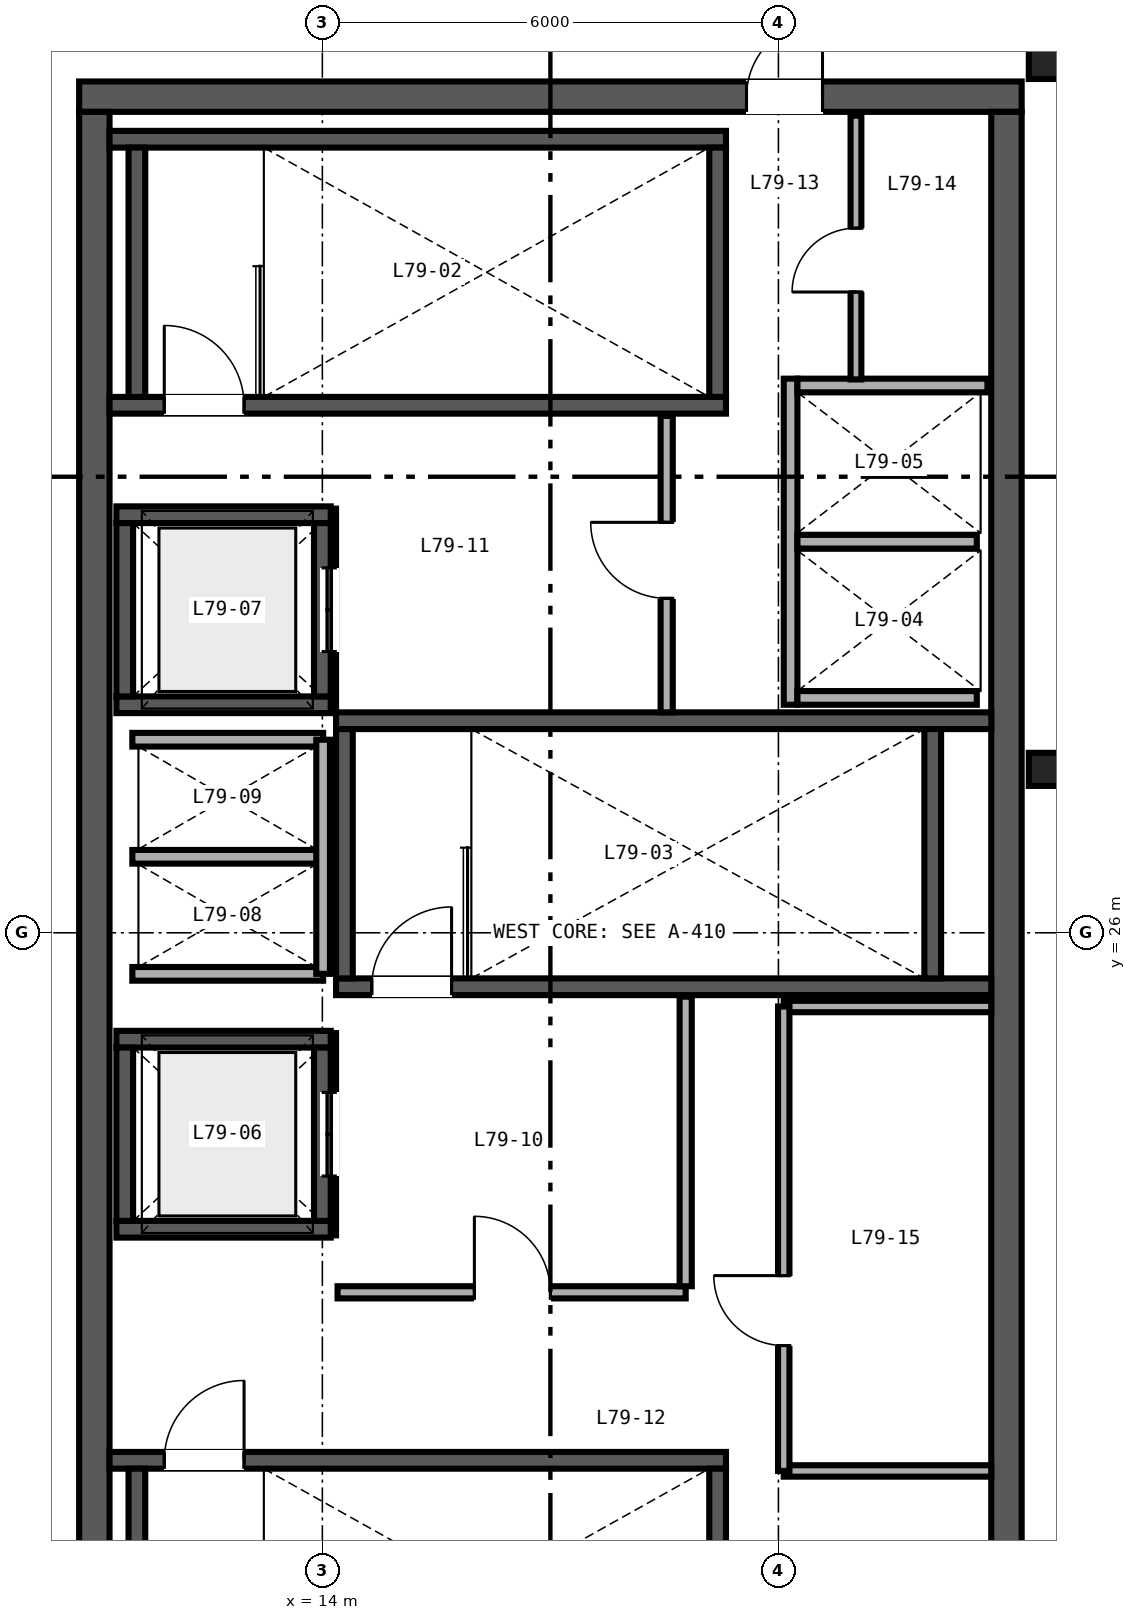
"""IFC4 building model, lengths in metres.
Left out: names, types, materials, properties, quantities, classifications, styles, units other than length and angle.
Written with IfcOpenShell. Run it as: python <this file> out.ifc"""

import sys

from ifc_helpers import new_model, si_unit, direction, frame, frame_2d, origin, origin_2d, place, context, subcontext, project, spatial, rectangle, i_section, extrude, source, transform, mapped, element, fill, save


model = new_model("IFC4")
c1 = context("Model", 3, precision=1e-05, world=origin(), true_north=direction((0.0, 1.0)))
c2 = subcontext(c1, "Body", "Model", "MODEL_VIEW")
j1 = project(units=[si_unit("LENGTHUNIT", "METRE"), si_unit("PLANEANGLEUNIT", "RADIAN")], contexts=[c1])
p1 = place(None, origin())
s1 = spatial("IfcSite", under=j1, at=p1, CompositionType="ELEMENT")
p2 = place(p1, origin())
s2 = spatial("IfcBuilding", under=s1, at=p2, CompositionType="ELEMENT")
p3 = place(p2, frame((0.0, 0.0, 309.6)))
s3 = spatial("IfcBuildingStorey", under=s2, at=p3, CompositionType="ELEMENT", Elevation=309.6)
p4 = place(p3, frame((10.8, 37.0, 0.0), z_axis=(0.0, 0.0, 1.0), x_axis=(1.0, 0.0, 0.0)))
e1 = element("IfcWall", 1, at=p4, inside=s3, PredefinedType="SHEAR", context=c2, shape_type="SweptSolid", body=[
    extrude(rectangle(XDim=12.4, YDim=0.4, at=frame_2d((6.2, 0.0))), origin(), (0.0, 0.0, 1.0), 5.0),
])
p5 = place(p4, frame((8.78, 0.0, 0.0)))
e2 = element("IfcOpeningElement", 2, at=p5, cuts=e1, PredefinedType="OPENING", context=c2, shape_type="SweptSolid", body=[
    extrude(rectangle(XDim=1.0, YDim=2.15, at=frame_2d((0.5, 1.075))), frame((0.0, 0.21, 0.0), z_axis=(0.0, -1.0, 0.0), x_axis=(1.0, 0.0, 0.0)), (0.0, 0.0, 1.0), 0.42),
])
for number, where, z_axis, x_axis in (
    (3, (11.0, 15.2, 0.0), (0.0, 0.0, 1.0), (0.0, 1.0, 0.0)),
    (4, (23.0, 15.2, 0.0), (0.0, 0.0, 1.0), (0.0, 1.0, 0.0)),
):
    element("IfcWall", number, at=place(p3, frame(where, z_axis=z_axis, x_axis=x_axis)), inside=s3, PredefinedType="SHEAR", context=c2, shape_type="SweptSolid", body=[
        extrude(rectangle(XDim=21.6, YDim=0.4, at=frame_2d((10.8, 0.0))), origin(), (0.0, 0.0, 1.0), 5.0),
    ])
p6 = place(p3, frame((11.2, 19.06, 0.0), z_axis=(0.0, 0.0, 1.0), x_axis=(1.0, 0.0, 0.0)))
e5 = element("IfcWall", 5, at=p6, inside=s3, PredefinedType="SHEAR", context=c2, shape_type="SweptSolid", body=[
    extrude(rectangle(XDim=8.11, YDim=0.22, at=frame_2d((4.055, 0.0))), origin(), (0.0, 0.0, 1.0), 5.0),
])
p7 = place(p6, frame((0.72, 0.0, 0.0)))
e6 = element("IfcOpeningElement", 6, at=p7, cuts=e5, PredefinedType="OPENING", context=c2, shape_type="SweptSolid", body=[
    extrude(rectangle(XDim=1.05, YDim=2.15, at=frame_2d((0.525, 1.075))), frame((0.0, 0.12, 0.0), z_axis=(0.0, -1.0, 0.0), x_axis=(1.0, 0.0, 0.0)), (0.0, 0.0, 1.0), 0.24),
])
for number, where, z_axis, x_axis in (
    (7, (11.56, 15.67, 0.0), (0.0, 0.0, 1.0), (0.0, 1.0, 0.0)),
    (8, (19.2, 15.67, 0.0), (0.0, 0.0, 1.0), (0.0, 1.0, 0.0)),
):
    element("IfcWall", number, at=place(p3, frame(where, z_axis=z_axis, x_axis=x_axis)), inside=s3, PredefinedType="SHEAR", context=c2, shape_type="SweptSolid", body=[
        extrude(rectangle(XDim=3.28, YDim=0.22, at=frame_2d((1.64, 0.0))), origin(), (0.0, 0.0, 1.0), 5.0),
    ])
p8 = place(p3, frame((11.2, 32.94, 0.0), z_axis=(0.0, 0.0, 1.0), x_axis=(1.0, 0.0, 0.0)))
e9 = element("IfcWall", 9, at=p8, inside=s3, PredefinedType="SHEAR", context=c2, shape_type="SweptSolid", body=[
    extrude(rectangle(XDim=8.11, YDim=0.22, at=frame_2d((4.055, 0.0))), origin(), (0.0, 0.0, 1.0), 5.0),
])
p9 = place(p8, frame((0.72, 0.0, 0.0)))
e10 = element("IfcOpeningElement", 10, at=p9, cuts=e9, PredefinedType="OPENING", context=c2, shape_type="SweptSolid", body=[
    extrude(rectangle(XDim=1.05, YDim=2.15, at=frame_2d((0.525, 1.075))), frame((0.0, 0.12, 0.0), z_axis=(0.0, -1.0, 0.0), x_axis=(1.0, 0.0, 0.0)), (0.0, 0.0, 1.0), 0.24),
])
p10 = place(p3, frame((11.2, 36.44, 0.0), z_axis=(0.0, 0.0, 1.0), x_axis=(1.0, 0.0, 0.0)))
e11 = element("IfcWall", 11, at=p10, inside=s3, PredefinedType="SHEAR", context=c2, shape_type="SweptSolid", body=[
    extrude(rectangle(XDim=8.11, YDim=0.22, at=frame_2d((4.055, 0.0))), origin(), (0.0, 0.0, 1.0), 5.0),
])
for number, where, z_axis, x_axis in (
    (12, (11.56, 33.05, 0.0), (0.0, 0.0, 1.0), (0.0, 1.0, 0.0)),
    (13, (19.2, 33.05, 0.0), (0.0, 0.0, 1.0), (0.0, 1.0, 0.0)),
):
    element("IfcWall", number, at=place(p3, frame(where, z_axis=z_axis, x_axis=x_axis)), inside=s3, PredefinedType="SHEAR", context=c2, shape_type="SweptSolid", body=[
        extrude(rectangle(XDim=3.28, YDim=0.22, at=frame_2d((1.64, 0.0))), origin(), (0.0, 0.0, 1.0), 5.0),
    ])
p11 = place(p3, frame((14.18, 25.29, 0.0), z_axis=(0.0, 0.0, 1.0), x_axis=(1.0, 0.0, 0.0)))
e14 = element("IfcWall", 14, at=p11, inside=s3, PredefinedType="SHEAR", context=c2, shape_type="SweptSolid", body=[
    extrude(rectangle(XDim=8.62, YDim=0.22, at=frame_2d((4.31, 0.0))), origin(), (0.0, 0.0, 1.0), 5.0),
])
p12 = place(p11, frame((0.47, 0.0, 0.0)))
e15 = element("IfcOpeningElement", 15, at=p12, cuts=e14, PredefinedType="OPENING", context=c2, shape_type="SweptSolid", body=[
    extrude(rectangle(XDim=1.05, YDim=2.15, at=frame_2d((0.525, 1.075))), frame((0.0, 0.12, 0.0), z_axis=(0.0, -1.0, 0.0), x_axis=(1.0, 0.0, 0.0)), (0.0, 0.0, 1.0), 0.24),
])
p13 = place(p3, frame((14.18, 28.79, 0.0), z_axis=(0.0, 0.0, 1.0), x_axis=(1.0, 0.0, 0.0)))
e16 = element("IfcWall", 16, at=p13, inside=s3, PredefinedType="SHEAR", context=c2, shape_type="SweptSolid", body=[
    extrude(rectangle(XDim=8.62, YDim=0.22, at=frame_2d((4.31, 0.0))), origin(), (0.0, 0.0, 1.0), 5.0),
])
for number, where, z_axis, x_axis in (
    (17, (14.29, 25.4, 0.0), (0.0, 0.0, 1.0), (0.0, 1.0, 0.0)),
    (18, (22.03, 25.4, 0.0), (0.0, 0.0, 1.0), (0.0, 1.0, 0.0)),
):
    element("IfcWall", number, at=place(p3, frame(where, z_axis=z_axis, x_axis=x_axis)), inside=s3, PredefinedType="SHEAR", context=c2, shape_type="SweptSolid", body=[
        extrude(rectangle(XDim=3.28, YDim=0.22, at=frame_2d((1.64, 0.0))), origin(), (0.0, 0.0, 1.0), 5.0),
    ])
m1 = source(origin(), c2, "Body", "SweptSolid", [
    extrude(i_section(OverallWidth=0.412, OverallDepth=0.435, WebThickness=0.036, FlangeThickness=0.057, FilletRadius=0.025, at=origin_2d()), origin(), (0.0, 0.0, 1.0), 5.0),
])
for number, where, z_axis, x_axis in (
    (19, (23.5, 28.15, 0.0), (0.0, 0.0, 1.0), (1.0, 0.0, 0.0)),
    (20, (23.5, 37.45, 0.0), (0.0, 0.0, 1.0), (1.0, 0.0, 0.0)),
):
    element("IfcColumn", number, at=place(p3, frame(where, z_axis=z_axis, x_axis=x_axis)), inside=s3, PredefinedType="COLUMN", context=c2, shape_type="MappedRepresentation", body=[
        mapped(m1, transform((0.0, 0.0, 0.0), scale=1.0)),
    ])
p14 = place(p3, frame((20.16, 29.0, 0.0), z_axis=(0.0, 0.0, 1.0), x_axis=(0.0, 1.0, 0.0)))
e21 = element("IfcWall", 21, at=p14, inside=s3, PredefinedType="SOLIDWALL", context=c2, shape_type="SweptSolid", body=[
    extrude(rectangle(XDim=4.29, YDim=0.18, at=frame_2d((2.145, 0.0))), origin(), (0.0, 0.0, 1.0), 4.591),
])
p15 = place(p3, frame((20.25, 29.09, 0.0), z_axis=(0.0, 0.0, 1.0), x_axis=(1.0, 0.0, 0.0)))
e22 = element("IfcWall", 22, at=p15, inside=s3, PredefinedType="SOLIDWALL", context=c2, shape_type="SweptSolid", body=[
    extrude(rectangle(XDim=2.36, YDim=0.18, at=frame_2d((1.18, 0.0))), origin(), (0.0, 0.0, 1.0), 4.591),
])
p16 = place(p3, frame((20.25, 33.2, 0.0), z_axis=(0.0, 0.0, 1.0), x_axis=(1.0, 0.0, 0.0)))
e23 = element("IfcWall", 23, at=p16, inside=s3, PredefinedType="SOLIDWALL", context=c2, shape_type="SweptSolid", body=[
    extrude(rectangle(XDim=2.5, YDim=0.18, at=frame_2d((1.25, 0.0))), origin(), (0.0, 0.0, 1.0), 5.0),
])
p17 = place(p3, frame((20.25, 31.145, 0.0), z_axis=(0.0, 0.0, 1.0), x_axis=(1.0, 0.0, 0.0)))
e24 = element("IfcWall", 24, at=p17, inside=s3, PredefinedType="SOLIDWALL", context=c2, shape_type="SweptSolid", body=[
    extrude(rectangle(XDim=2.36, YDim=0.18, at=frame_2d((1.18, 0.0))), origin(), (0.0, 0.0, 1.0), 5.0),
])
for number, where, z_axis, x_axis in (
    (25, (11.5, 22.11, 0.0), (0.0, 0.0, 1.0), (1.0, 0.0, 0.0)),
    (26, (11.5, 24.59, 0.0), (0.0, 0.0, 1.0), (1.0, 0.0, 0.0)),
):
    element("IfcWall", number, at=place(p3, frame(where, z_axis=z_axis, x_axis=x_axis)), inside=s3, PredefinedType="SOLIDWALL", context=c2, shape_type="SweptSolid", body=[
        extrude(rectangle(XDim=2.5, YDim=0.18, at=frame_2d((1.25, 0.0))), origin(), (0.0, 0.0, 1.0), 4.591),
    ])
p18 = place(p3, frame((14.09, 22.02, 0.0), z_axis=(0.0, 0.0, 1.0), x_axis=(0.0, 1.0, 0.0)))
e27 = element("IfcWall", 27, at=p18, inside=s3, PredefinedType="SOLIDWALL", context=c2, shape_type="SweptSolid", body=[
    extrude(rectangle(XDim=2.66, YDim=0.18, at=frame_2d((1.33, 0.0))), origin(), (0.0, 0.0, 1.0), 4.591),
])
p19 = place(p18, frame((0.78, 0.0, 0.0)))
e28 = element("IfcOpeningElement", 28, at=p19, cuts=e27, PredefinedType="OPENING", context=c2, shape_type="SweptSolid", body=[
    extrude(rectangle(XDim=1.1, YDim=2.2, at=frame_2d((0.55, 1.1))), frame((0.0, 0.1, 0.0), z_axis=(0.0, -1.0, 0.0), x_axis=(1.0, 0.0, 0.0)), (0.0, 0.0, 1.0), 0.2),
])
for number, where, z_axis, x_axis in (
    (29, (11.5, 29.01, 0.0), (0.0, 0.0, 1.0), (1.0, 0.0, 0.0)),
    (30, (11.5, 31.49, 0.0), (0.0, 0.0, 1.0), (1.0, 0.0, 0.0)),
):
    element("IfcWall", number, at=place(p3, frame(where, z_axis=z_axis, x_axis=x_axis)), inside=s3, PredefinedType="SOLIDWALL", context=c2, shape_type="SweptSolid", body=[
        extrude(rectangle(XDim=2.5, YDim=0.18, at=frame_2d((1.25, 0.0))), origin(), (0.0, 0.0, 1.0), 4.591),
    ])
p20 = place(p3, frame((14.09, 28.92, 0.0), z_axis=(0.0, 0.0, 1.0), x_axis=(0.0, 1.0, 0.0)))
e31 = element("IfcWall", 31, at=p20, inside=s3, PredefinedType="SOLIDWALL", context=c2, shape_type="SweptSolid", body=[
    extrude(rectangle(XDim=2.66, YDim=0.18, at=frame_2d((1.33, 0.0))), origin(), (0.0, 0.0, 1.0), 4.591),
])
p21 = place(p20, frame((0.78, 0.0, 0.0)))
e32 = element("IfcOpeningElement", 32, at=p21, cuts=e31, PredefinedType="OPENING", context=c2, shape_type="SweptSolid", body=[
    extrude(rectangle(XDim=1.1, YDim=2.2, at=frame_2d((0.55, 1.1))), frame((0.0, 0.1, 0.0), z_axis=(0.0, -1.0, 0.0), x_axis=(1.0, 0.0, 0.0)), (0.0, 0.0, 1.0), 0.2),
])
for number, where, z_axis, x_axis in (
    (33, (11.5, 25.46, 0.0), (0.0, 0.0, 1.0), (1.0, 0.0, 0.0)),
    (34, (11.5, 27.0, 0.0), (0.0, 0.0, 1.0), (1.0, 0.0, 0.0)),
    (35, (11.5, 28.54, 0.0), (0.0, 0.0, 1.0), (1.0, 0.0, 0.0)),
):
    element("IfcWall", number, at=place(p3, frame(where, z_axis=z_axis, x_axis=x_axis)), inside=s3, PredefinedType="SOLIDWALL", context=c2, shape_type="SweptSolid", body=[
        extrude(rectangle(XDim=2.51, YDim=0.18, at=frame_2d((1.255, 0.0))), origin(), (0.0, 0.0, 1.0), 5.0),
    ])
p22 = place(p3, frame((14.01, 25.46, 0.0), z_axis=(0.0, 0.0, 1.0), x_axis=(0.0, 1.0, 0.0)))
e36 = element("IfcWall", 36, at=p22, inside=s3, PredefinedType="SOLIDWALL", context=c2, shape_type="SweptSolid", body=[
    extrude(rectangle(XDim=3.08, YDim=0.18, at=frame_2d((1.54, 0.0))), origin(), (0.0, 0.0, 1.0), 5.0),
])
p23 = place(p3, frame((14.2, 21.27, 0.0), z_axis=(0.0, 0.0, 1.0), x_axis=(1.0, 0.0, 0.0)))
e37 = element("IfcWall", 37, at=p23, inside=s3, PredefinedType="PARTITIONING", context=c2, shape_type="SweptSolid", body=[
    extrude(rectangle(XDim=4.58, YDim=0.16, at=frame_2d((2.29, 0.0))), origin(), (0.0, 0.0, 1.0), 5.0),
])
p24 = place(p23, frame((1.8, 0.0, 0.0)))
e38 = element("IfcOpeningElement", 38, at=p24, cuts=e37, PredefinedType="OPENING", context=c2, shape_type="SweptSolid", body=[
    extrude(rectangle(XDim=1.0, YDim=2.15, at=frame_2d((0.5, 1.075))), frame((0.0, 0.09, 0.0), z_axis=(0.0, -1.0, 0.0), x_axis=(1.0, 0.0, 0.0)), (0.0, 0.0, 1.0), 0.18),
])
p25 = place(p3, frame((18.78, 21.35, 0.0), z_axis=(0.0, 0.0, 1.0), x_axis=(0.0, 1.0, 0.0)))
e39 = element("IfcWall", 39, at=p25, inside=s3, PredefinedType="PARTITIONING", context=c2, shape_type="SweptSolid", body=[
    extrude(rectangle(XDim=3.81, YDim=0.16, at=frame_2d((1.905, 0.0))), origin(), (0.0, 0.0, 1.0), 4.591),
])
p26 = place(p3, frame((18.53, 28.9, 0.0), z_axis=(0.0, 0.0, 1.0), x_axis=(0.0, 1.0, 0.0)))
e40 = element("IfcWall", 40, at=p26, inside=s3, PredefinedType="PARTITIONING", context=c2, shape_type="SweptSolid", body=[
    extrude(rectangle(XDim=3.9, YDim=0.16, at=frame_2d((1.95, 0.0))), origin(), (0.0, 0.0, 1.0), 4.591),
])
p27 = place(p26, frame((1.5, 0.0, 0.0)))
e41 = element("IfcOpeningElement", 41, at=p27, cuts=e40, PredefinedType="OPENING", context=c2, shape_type="SweptSolid", body=[
    extrude(rectangle(XDim=1.0, YDim=2.15, at=frame_2d((0.5, 1.075))), frame((0.0, 0.09, 0.0), z_axis=(0.0, -1.0, 0.0), x_axis=(1.0, 0.0, 0.0)), (0.0, 0.0, 1.0), 0.18),
])
p28 = place(p3, frame((21.02, 33.28, 0.0), z_axis=(0.0, 0.0, 1.0), x_axis=(0.0, 1.0, 0.0)))
e42 = element("IfcWall", 42, at=p28, inside=s3, PredefinedType="PARTITIONING", context=c2, shape_type="SweptSolid", body=[
    extrude(rectangle(XDim=3.47, YDim=0.142, at=frame_2d((1.735, 0.0))), origin(), (0.0, 0.0, 1.0), 5.0),
])
p29 = place(p28, frame((1.15, 0.0, 0.0)))
e43 = element("IfcOpeningElement", 43, at=p29, cuts=e42, PredefinedType="OPENING", context=c2, shape_type="SweptSolid", body=[
    extrude(rectangle(XDim=0.84, YDim=2.1, at=frame_2d((0.42, 1.05))), frame((0.0, 0.081, 0.0), z_axis=(0.0, -1.0, 0.0), x_axis=(1.0, 0.0, 0.0)), (0.0, 0.0, 1.0), 0.162),
])
for number, where, z_axis, x_axis in (
    (44, (20.07, 18.92, 0.0), (0.0, 0.0, 1.0), (1.0, 0.0, 0.0)),
    (45, (20.07, 25.03, 0.0), (0.0, 0.0, 1.0), (1.0, 0.0, 0.0)),
):
    element("IfcWall", number, at=place(p3, frame(where, z_axis=z_axis, x_axis=x_axis)), inside=s3, PredefinedType="PARTITIONING", context=c2, shape_type="SweptSolid", body=[
        extrude(rectangle(XDim=2.73, YDim=0.15, at=frame_2d((1.365, 0.0))), origin(), (0.0, 0.0, 1.0), 5.0),
    ])
p30 = place(p3, frame((20.07, 18.92, 0.0), z_axis=(0.0, 0.0, 1.0), x_axis=(0.0, 1.0, 0.0)))
e46 = element("IfcWall", 46, at=p30, inside=s3, PredefinedType="PARTITIONING", context=c2, shape_type="SweptSolid", body=[
    extrude(rectangle(XDim=6.11, YDim=0.15, at=frame_2d((3.055, 0.0))), origin(), (0.0, 0.0, 1.0), 4.1),
])
p31 = place(p30, frame((1.65, 0.0, 0.0)))
e47 = element("IfcOpeningElement", 47, at=p31, cuts=e46, PredefinedType="OPENING", context=c2, shape_type="SweptSolid", body=[
    extrude(rectangle(XDim=0.92, YDim=2.15, at=frame_2d((0.46, 1.075))), frame((0.0, 0.085, 0.0), z_axis=(0.0, -1.0, 0.0), x_axis=(1.0, 0.0, 0.0)), (0.0, 0.0, 1.0), 0.17),
])
for number, where, z_axis, x_axis in (
    (48, (11.29, 22.1, 5.0), (0.0, 0.0, 1.0), (1.0, 0.0, 0.0)),
    (49, (11.29, 24.6, 5.0), (0.0, 0.0, 1.0), (1.0, 0.0, 0.0)),
):
    element("IfcWall", number, at=place(p3, frame(where, z_axis=z_axis, x_axis=x_axis)), inside=s3, PredefinedType="SHEAR", context=c2, shape_type="SweptSolid", body=[
        extrude(rectangle(XDim=2.82, YDim=0.22, at=frame_2d((1.41, 0.0))), origin(), (0.0, 0.0, 1.0), 3.4),
    ])
for number, where, z_axis, x_axis in (
    (50, (11.4, 22.21, 5.0), (0.0, 0.0, 1.0), (0.0, 1.0, 0.0)),
    (51, (14.0, 22.21, 5.0), (0.0, 0.0, 1.0), (0.0, 1.0, 0.0)),
):
    element("IfcWall", number, at=place(p3, frame(where, z_axis=z_axis, x_axis=x_axis)), inside=s3, PredefinedType="SHEAR", context=c2, shape_type="SweptSolid", body=[
        extrude(rectangle(XDim=2.28, YDim=0.22, at=frame_2d((1.14, 0.0))), origin(), (0.0, 0.0, 1.0), 3.4),
    ])
for number, where, z_axis, x_axis in (
    (52, (11.29, 29.0, 5.0), (0.0, 0.0, 1.0), (1.0, 0.0, 0.0)),
    (53, (11.29, 31.5, 5.0), (0.0, 0.0, 1.0), (1.0, 0.0, 0.0)),
):
    element("IfcWall", number, at=place(p3, frame(where, z_axis=z_axis, x_axis=x_axis)), inside=s3, PredefinedType="SHEAR", context=c2, shape_type="SweptSolid", body=[
        extrude(rectangle(XDim=2.82, YDim=0.22, at=frame_2d((1.41, 0.0))), origin(), (0.0, 0.0, 1.0), 3.4),
    ])
for number, where, z_axis, x_axis in (
    (54, (11.4, 29.11, 5.0), (0.0, 0.0, 1.0), (0.0, 1.0, 0.0)),
    (55, (14.0, 29.11, 5.0), (0.0, 0.0, 1.0), (0.0, 1.0, 0.0)),
):
    element("IfcWall", number, at=place(p3, frame(where, z_axis=z_axis, x_axis=x_axis)), inside=s3, PredefinedType="SHEAR", context=c2, shape_type="SweptSolid", body=[
        extrude(rectangle(XDim=2.28, YDim=0.22, at=frame_2d((1.14, 0.0))), origin(), (0.0, 0.0, 1.0), 3.4),
    ])
m2 = source(origin(), c2, "Body", "SweptSolid", [
    extrude(rectangle(XDim=1.05, YDim=2.15, at=frame_2d((0.525, 1.075))), frame((0.0, 0.025, 0.0), z_axis=(0.0, -1.0, 0.0), x_axis=(1.0, 0.0, 0.0)), (0.0, 0.0, 1.0), 0.05),
])
p32 = place(p7, origin())
e56 = element("IfcDoor", 56, at=p32, inside=s3, OperationType="SINGLE_SWING_RIGHT", PredefinedType="DOOR", context=c2, shape_type="MappedRepresentation", body=[
    mapped(m2, transform((0.0, 0.0, 0.0), scale=1.0)),
])
fill(e6, e56)
p33 = place(p9, origin())
e57 = element("IfcDoor", 57, at=p33, inside=s3, OperationType="SINGLE_SWING_LEFT", PredefinedType="DOOR", context=c2, shape_type="MappedRepresentation", body=[
    mapped(m2, transform((0.0, 0.0, 0.0), scale=1.0)),
])
fill(e10, e57)
p34 = place(p12, origin())
e58 = element("IfcDoor", 58, at=p34, inside=s3, OperationType="SINGLE_SWING_RIGHT", PredefinedType="DOOR", context=c2, shape_type="MappedRepresentation", body=[
    mapped(m2, transform((0.0, 0.0, 0.0), scale=1.0)),
])
fill(e15, e58)
m3 = source(origin(), c2, "Body", "SweptSolid", [
    extrude(rectangle(XDim=1.1, YDim=2.2, at=frame_2d((0.55, 1.1))), frame((0.0, 0.025, 0.0), z_axis=(0.0, -1.0, 0.0), x_axis=(1.0, 0.0, 0.0)), (0.0, 0.0, 1.0), 0.05),
])
p35 = place(p19, origin())
e59 = element("IfcDoor", 59, at=p35, inside=s3, OperationType="DOUBLE_DOOR_SLIDING", PredefinedType="DOOR", context=c2, shape_type="MappedRepresentation", body=[
    mapped(m3, transform((0.0, 0.0, 0.0), scale=1.0)),
])
fill(e28, e59)
p36 = place(p21, origin())
e60 = element("IfcDoor", 60, at=p36, inside=s3, OperationType="DOUBLE_DOOR_SLIDING", PredefinedType="DOOR", context=c2, shape_type="MappedRepresentation", body=[
    mapped(m3, transform((0.0, 0.0, 0.0), scale=1.0)),
])
fill(e32, e60)
m4 = source(origin(), c2, "Body", "SweptSolid", [
    extrude(rectangle(XDim=1.0, YDim=2.15, at=frame_2d((0.5, 1.075))), frame((0.0, 0.025, 0.0), z_axis=(0.0, -1.0, 0.0), x_axis=(1.0, 0.0, 0.0)), (0.0, 0.0, 1.0), 0.05),
])
p37 = place(p24, origin())
e61 = element("IfcDoor", 61, at=p37, inside=s3, OperationType="SINGLE_SWING_LEFT", PredefinedType="DOOR", context=c2, shape_type="MappedRepresentation", body=[
    mapped(m4, transform((0.0, 0.0, 0.0), scale=1.0)),
])
fill(e38, e61)
p38 = place(p27, origin())
e62 = element("IfcDoor", 62, at=p38, inside=s3, OperationType="SINGLE_SWING_RIGHT", PredefinedType="DOOR", context=c2, shape_type="MappedRepresentation", body=[
    mapped(m4, transform((0.0, 0.0, 0.0), scale=1.0)),
])
fill(e41, e62)
m5 = source(origin(), c2, "Body", "SweptSolid", [
    extrude(rectangle(XDim=0.84, YDim=2.1, at=frame_2d((0.42, 1.05))), frame((0.0, 0.025, 0.0), z_axis=(0.0, -1.0, 0.0), x_axis=(1.0, 0.0, 0.0)), (0.0, 0.0, 1.0), 0.05),
])
p39 = place(p29, origin())
e63 = element("IfcDoor", 63, at=p39, inside=s3, OperationType="SINGLE_SWING_LEFT", PredefinedType="DOOR", context=c2, shape_type="MappedRepresentation", body=[
    mapped(m5, transform((0.0, 0.0, 0.0), scale=1.0)),
])
fill(e43, e63)
p40 = place(p5, origin())
e64 = element("IfcDoor", 64, at=p40, inside=s3, OperationType="SINGLE_SWING_RIGHT", PredefinedType="DOOR", context=c2, shape_type="MappedRepresentation", body=[
    mapped(m4, transform((0.0, 0.0, 0.0), scale=1.0)),
])
fill(e2, e64)
m6 = source(origin(), c2, "Body", "SweptSolid", [
    extrude(rectangle(XDim=0.92, YDim=2.15, at=frame_2d((0.46, 1.075))), frame((0.0, 0.025, 0.0), z_axis=(0.0, -1.0, 0.0), x_axis=(1.0, 0.0, 0.0)), (0.0, 0.0, 1.0), 0.05),
])
p41 = place(p31, origin())
e65 = element("IfcDoor", 65, at=p41, inside=s3, OperationType="SINGLE_SWING_RIGHT", PredefinedType="DOOR", context=c2, shape_type="MappedRepresentation", body=[
    mapped(m6, transform((0.0, 0.0, 0.0), scale=1.0)),
])
fill(e47, e65)
save(model, sys.argv[1])
